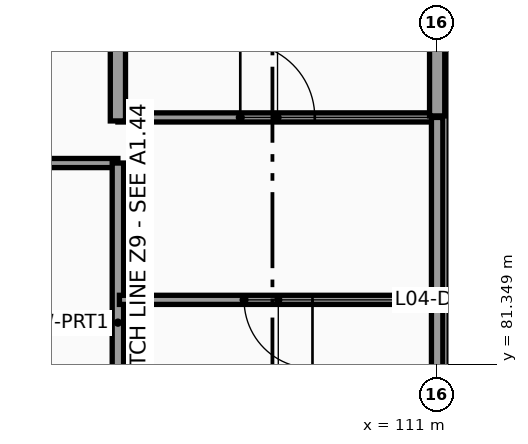
"""IFC4 building model, lengths in metres.
Left out: names, types, materials, properties, quantities, classifications, styles, units other than length and angle.
Written with IfcOpenShell. Run it as: python <this file> out.ifc"""

import sys

from ifc_helpers import new_model, si_unit, direction, frame, frame_2d, origin, place, context, subcontext, project, spatial, rectangle, extrude, element, fill, save


model = new_model("IFC4")
c1 = context("Model", 3, precision=1e-05, world=origin(), true_north=direction((0.0, 1.0)))
c2 = subcontext(c1, "Body", "Model", "MODEL_VIEW")
j1 = project(units=[si_unit("LENGTHUNIT", "METRE"), si_unit("PLANEANGLEUNIT", "RADIAN")], contexts=[c1])
p1 = place(None, origin())
s1 = spatial("IfcSite", under=j1, at=p1, CompositionType="ELEMENT")
p2 = place(p1, origin())
s2 = spatial("IfcBuilding", under=s1, at=p2, CompositionType="ELEMENT")
p3 = place(p2, frame((0.0, 0.0, 15.0)))
s3 = spatial("IfcBuildingStorey", under=s2, at=p3, CompositionType="ELEMENT", Elevation=15.0)
p4 = place(p3, frame((102.6, 84.0, 0.0), z_axis=(0.0, 0.0, 1.0), x_axis=(1.0, 0.0, 0.0)))
e1 = element("IfcWall", 1, at=p4, inside=s3, PredefinedType="PARTITIONING", context=c2, shape_type="SweptSolid", body=[
    extrude(rectangle(XDim=4.2, YDim=0.12, at=frame_2d((2.1, 0.0))), origin(), (0.0, 0.0, 1.0), 2.99),
])
p5 = place(p4, frame((1.65, 0.0, 0.0)))
e2 = element("IfcOpeningElement", 2, at=p5, cuts=e1, PredefinedType="OPENING", context=c2, shape_type="SweptSolid", body=[
    extrude(rectangle(XDim=0.9, YDim=2.1, at=frame_2d((0.45, 1.05))), frame((0.0, 0.07, 0.0), z_axis=(0.0, -1.0, 0.0), x_axis=(1.0, 0.0, 0.0)), (0.0, 0.0, 1.0), 0.14),
])
p6 = place(p3, frame((106.8, 84.0, 0.0), z_axis=(0.0, 0.0, 1.0), x_axis=(0.0, -1.0, 0.0)))
e3 = element("IfcWall", 3, at=p6, inside=s3, PredefinedType="PARTITIONING", context=c2, shape_type="SweptSolid", body=[
    extrude(rectangle(XDim=4.2, YDim=0.15, at=frame_2d((2.1, 0.0))), origin(), (0.0, 0.0, 1.0), 2.63),
])
p7 = place(p3, frame((106.82, 82.2, 0.0), z_axis=(0.0, 0.0, 1.0), x_axis=(1.0, 0.0, 0.0)))
e4 = element("IfcWall", 4, at=p7, inside=s3, PredefinedType="PARTITIONING", context=c2, shape_type="SweptSolid", body=[
    extrude(rectangle(XDim=4.18, YDim=0.12, at=frame_2d((2.09, 0.0))), origin(), (0.0, 0.0, 1.0), 2.63),
])
p8 = place(p7, frame((1.64, 0.0, 0.0)))
e5 = element("IfcOpeningElement", 5, at=p8, cuts=e4, PredefinedType="OPENING", context=c2, shape_type="SweptSolid", body=[
    extrude(rectangle(XDim=0.9, YDim=2.1, at=frame_2d((0.45, 1.05))), frame((0.0, 0.07, 0.0), z_axis=(0.0, -1.0, 0.0), x_axis=(1.0, 0.0, 0.0)), (0.0, 0.0, 1.0), 0.14),
])
p9 = place(p3, frame((111.0, 82.2, 0.0), z_axis=(0.0, 0.0, 1.0), x_axis=(0.0, -1.0, 0.0)))
e6 = element("IfcWall", 6, at=p9, inside=s3, PredefinedType="PARTITIONING", context=c2, shape_type="SweptSolid", body=[
    extrude(rectangle(XDim=2.177, YDim=0.15, at=frame_2d((1.088, 0.0))), origin(), (0.0, 0.0, 1.0), 2.63),
])
p10 = place(p3, frame((106.8, 84.6, 0.0), z_axis=(0.0, 0.0, 1.0), x_axis=(1.0, 0.0, 0.0)))
e7 = element("IfcWall", 7, at=p10, inside=s3, PredefinedType="PARTITIONING", context=c2, shape_type="SweptSolid", body=[
    extrude(rectangle(XDim=4.2, YDim=0.12, at=frame_2d((2.1, 0.0))), origin(), (0.0, 0.0, 1.0), 2.63),
])
p11 = place(p10, frame((1.61, 0.0, 0.0)))
e8 = element("IfcOpeningElement", 8, at=p11, cuts=e7, PredefinedType="OPENING", context=c2, shape_type="SweptSolid", body=[
    extrude(rectangle(XDim=0.98, YDim=2.1, at=frame_2d((0.49, 1.05))), frame((0.0, 0.07, 0.0), z_axis=(0.0, -1.0, 0.0), x_axis=(1.0, 0.0, 0.0)), (0.0, 0.0, 1.0), 0.14),
])
p12 = place(p3, frame((111.0, 84.6, 0.0), z_axis=(0.0, 0.0, 1.0), x_axis=(0.0, -1.0, 0.0)))
e9 = element("IfcWall", 9, at=p12, inside=s3, PredefinedType="PARTITIONING", context=c2, shape_type="SweptSolid", body=[
    extrude(rectangle(XDim=2.38, YDim=0.15, at=frame_2d((1.19, 0.0))), origin(), (0.0, 0.0, 1.0), 2.63),
])
p13 = place(p3, frame((106.8, 88.2, 0.0), z_axis=(0.0, 0.0, 1.0), x_axis=(0.0, -1.0, 0.0)))
e10 = element("IfcWall", 10, at=p13, inside=s3, PredefinedType="PARTITIONING", context=c2, shape_type="SweptSolid", body=[
    extrude(rectangle(XDim=3.646, YDim=0.2, at=frame_2d((1.823, 0.0))), origin(), (0.0, 0.0, 1.0), 2.48),
])
p14 = place(p3, frame((111.0, 87.977, 0.0), z_axis=(0.0, 0.0, 1.0), x_axis=(0.0, -1.0, 0.0)))
e11 = element("IfcWall", 11, at=p14, inside=s3, PredefinedType="PARTITIONING", context=c2, shape_type="SweptSolid", body=[
    extrude(rectangle(XDim=3.357, YDim=0.2, at=frame_2d((1.678, 0.0))), origin(), (0.0, 0.0, 1.0), 2.63),
])
p15 = place(p8, origin())
e12 = element("IfcDoor", 12, at=p15, inside=s3, OperationType="SINGLE_SWING_RIGHT", PredefinedType="DOOR", context=c2, shape_type="SweptSolid", body=[
    extrude(rectangle(XDim=0.9, YDim=2.1, at=frame_2d((0.45, 1.05))), frame((0.0, 0.025, 0.0), z_axis=(0.0, -1.0, 0.0), x_axis=(1.0, 0.0, 0.0)), (0.0, 0.0, 1.0), 0.05),
])
fill(e5, e12)
p16 = place(p11, origin())
e13 = element("IfcDoor", 13, at=p16, inside=s3, OperationType="SINGLE_SWING_LEFT", PredefinedType="DOOR", context=c2, shape_type="SweptSolid", body=[
    extrude(rectangle(XDim=0.98, YDim=2.1, at=frame_2d((0.49, 1.05))), frame((0.0, 0.025, 0.0), z_axis=(0.0, -1.0, 0.0), x_axis=(1.0, 0.0, 0.0)), (0.0, 0.0, 1.0), 0.05),
])
fill(e8, e13)
save(model, sys.argv[1])
